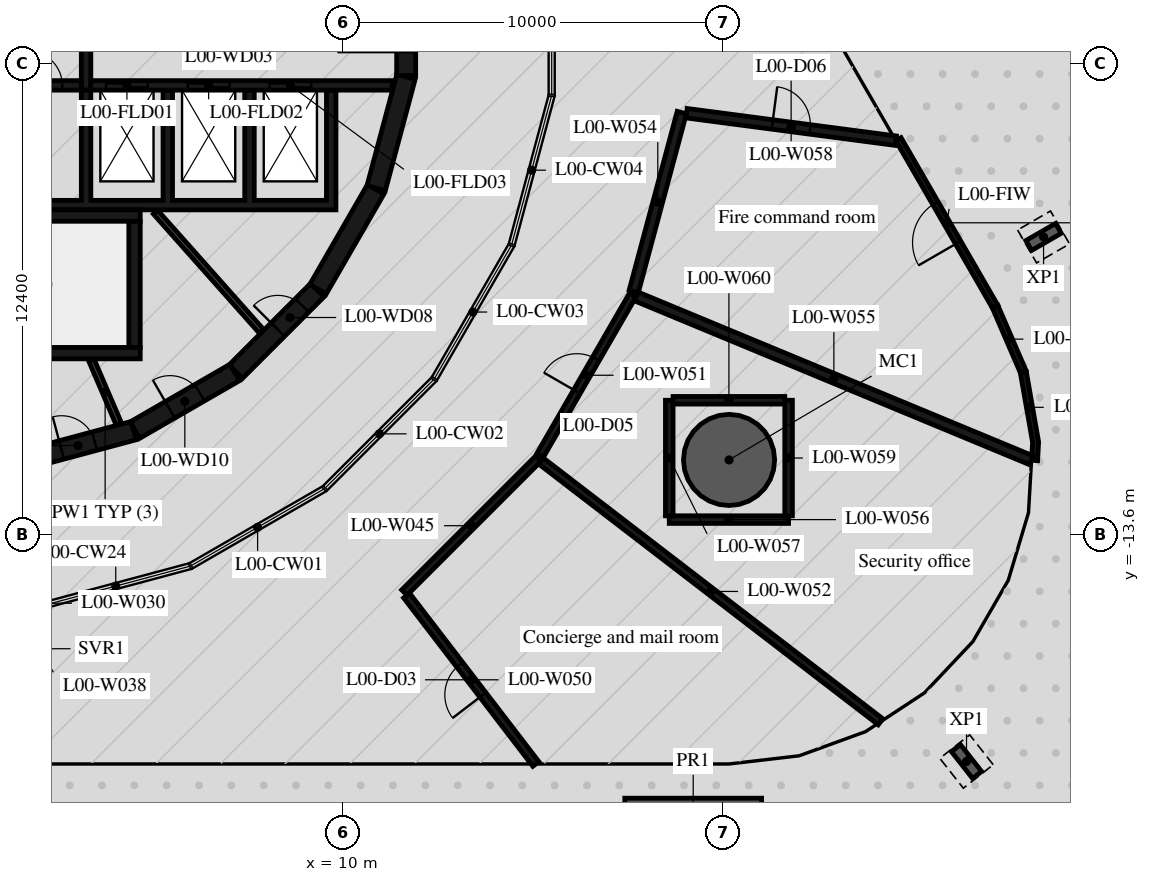
"""IFC4 building model, lengths in metres.
Left out: names, types, materials, properties, quantities, classifications, styles, units other than length and angle.
Written with IfcOpenShell. Run it as: python <this file> out.ifc"""

import sys

from ifc_helpers import new_model, si_unit, direction, frame, frame_2d, origin, origin_2d, place, context, subcontext, project, spatial, polyline, rectangle, hollow_circle, i_section, outline, extrude, element, fill, save


model = new_model("IFC4")
c1 = context("Model", 3, precision=1e-05, world=origin(), true_north=direction((0.0, 1.0)))
c2 = subcontext(c1, "Body", "Model", "MODEL_VIEW")
j1 = project(units=[si_unit("LENGTHUNIT", "METRE"), si_unit("PLANEANGLEUNIT", "RADIAN")], contexts=[c1])
p1 = place(None, origin())
s1 = spatial("IfcSite", under=j1, at=p1, CompositionType="ELEMENT")
p2 = place(p1, origin())
s2 = spatial("IfcBuilding", under=s1, at=p2, CompositionType="ELEMENT")
p3 = place(p2, origin())
s3 = spatial("IfcBuildingStorey", under=s2, at=p3, CompositionType="ELEMENT", Elevation=0.0)
p4 = place(p3, frame((20.144, -11.63, -0.42), z_axis=(0.0, 0.0, 1.0), x_axis=(1.0, 0.0, 0.0)))
e1 = element("IfcColumn", 1, at=p4, inside=s3, PredefinedType="COLUMN", context=c2, shape_type="SweptSolid", body=[
    extrude(hollow_circle(Radius=1.2, WallThickness=0.06, at=origin_2d()), origin(), (0.0, 0.0, 1.0), 9.04),
])
for number, where, z_axis, x_axis in (
    (2, (26.392, -19.565, -0.42), (0.0, 0.0, 1.0), (-0.786, -0.619, 0.0)),
    (3, (28.419, -5.763, -0.42), (0.0, 0.0, 1.0), (0.5, -0.866, 0.0)),
):
    element("IfcColumn", number, at=place(p3, frame(where, z_axis=z_axis, x_axis=x_axis)), inside=s3, PredefinedType="COLUMN", context=c2, shape_type="SweptSolid", body=[
        extrude(i_section(OverallWidth=0.3, OverallDepth=0.9, WebThickness=0.019, FlangeThickness=0.035, FilletRadius=0.03, at=origin_2d()), origin(), (0.0, 0.0, 1.0), 9.04),
    ])
p5 = place(p3, frame((19.2, -21.73, -0.42), z_axis=(0.0, 0.0, 1.0), x_axis=(1.0, 0.0, 0.0)))
e4 = element("IfcColumn", 4, at=p5, inside=s3, PredefinedType="COLUMN", context=c2, shape_type="SweptSolid", body=[
    extrude(rectangle(XDim=3.6, YDim=2.4, at=origin_2d()), origin(), (0.0, 0.0, 1.0), 9.04),
])
p6 = place(p3, frame((27.141, -7.59, 0.0), z_axis=(0.0, 0.0, 1.0), x_axis=(-0.500014995272, 0.866016746087, 0.0)))
e5 = element("IfcWall", 5, at=p6, inside=s3, PredefinedType="STANDARD", context=c2, shape_type="SweptSolid", body=[
    extrude(rectangle(XDim=5.081, YDim=0.16, at=frame_2d((2.541, 0.0))), origin(), (0.0, 0.0, 1.0), 8.62),
])
p7 = place(p6, frame((1.94, 0.0, 0.0)))
e6 = element("IfcOpeningElement", 6, at=p7, cuts=e5, PredefinedType="OPENING", context=c2, shape_type="SweptSolid", body=[
    extrude(rectangle(XDim=1.2, YDim=2.1, at=frame_2d((0.6, 1.05))), frame((0.0, 0.09, 0.0), z_axis=(0.0, -1.0, 0.0), x_axis=(1.0, 0.0, 0.0)), (0.0, 0.0, 1.0), 0.18),
])
p8 = place(p3, origin())
e7 = element("IfcWall", 7, at=p8, inside=s3, PredefinedType="STANDARD", context=c2, shape_type="SweptSolid", body=[
    extrude(outline(polyline([(27.808, -9.335), (28.13, -11.165), (28.102, -11.64), (28.262, -11.65), (28.289, -11.156), (27.965, -9.308), (27.808, -9.335)])), origin(), (0.0, 0.0, 1.0), 8.62),
])
p9 = place(p3, origin())
e8 = element("IfcWall", 8, at=p9, inside=s3, PredefinedType="STANDARD", context=c2, shape_type="SweptSolid", body=[
    extrude(outline(polyline([(27.072, -7.63), (27.808, -9.335), (27.954, -9.272), (27.219, -7.567), (27.072, -7.63)])), origin(), (0.0, 0.0, 1.0), 8.62),
])
p10 = place(p3, frame((1.55, -11.643, 0.0), z_axis=(0.0, 0.0, 1.0), x_axis=(0.965948410781, 0.258734743916, 0.0)))
e9 = element("IfcWall", 9, at=p10, inside=s3, PredefinedType="SHEAR", context=c2, shape_type="SweptSolid", body=[
    extrude(rectangle(XDim=3.033, YDim=0.5, at=frame_2d((1.516, 0.0))), origin(), (0.0, 0.0, 1.0), 8.62),
])
p11 = place(p10, frame((1.066, 0.0, 0.0)))
e10 = element("IfcOpeningElement", 10, at=p11, cuts=e9, PredefinedType="OPENING", context=c2, shape_type="SweptSolid", body=[
    extrude(rectangle(XDim=0.9, YDim=2.1, at=frame_2d((0.45, 1.05))), frame((0.0, 0.26, 0.0), z_axis=(0.0, -1.0, 0.0), x_axis=(1.0, 0.0, 0.0)), (0.0, 0.0, 1.0), 0.52),
])
p12 = place(p3, frame((4.51, -10.845, 0.0), z_axis=(0.0, 0.0, 1.0), x_axis=(0.865975092491, 0.500087131594, 0.0)))
e11 = element("IfcWall", 11, at=p12, inside=s3, PredefinedType="SHEAR", context=c2, shape_type="SweptSolid", body=[
    extrude(rectangle(XDim=3.033, YDim=0.5, at=frame_2d((1.516, 0.0))), origin(), (0.0, 0.0, 1.0), 8.62),
])
p13 = place(p12, frame((1.066, 0.0, 0.0)))
e12 = element("IfcOpeningElement", 12, at=p13, cuts=e11, PredefinedType="OPENING", context=c2, shape_type="SweptSolid", body=[
    extrude(rectangle(XDim=0.9, YDim=2.1, at=frame_2d((0.45, 1.05))), frame((0.0, 0.26, 0.0), z_axis=(0.0, -1.0, 0.0), x_axis=(1.0, 0.0, 0.0)), (0.0, 0.0, 1.0), 0.52),
])
p14 = place(p3, frame((7.164, -9.308, 0.0), z_axis=(0.0, 0.0, 1.0), x_axis=(0.707106781187, 0.707106781187, 0.0)))
e13 = element("IfcWall", 13, at=p14, inside=s3, PredefinedType="SHEAR", context=c2, shape_type="SweptSolid", body=[
    extrude(rectangle(XDim=3.032, YDim=0.5, at=frame_2d((1.516, 0.0))), origin(), (0.0, 0.0, 1.0), 8.62),
])
p15 = place(p14, frame((1.566, 0.0, 0.0)))
e14 = element("IfcOpeningElement", 14, at=p15, cuts=e13, PredefinedType="OPENING", context=c2, shape_type="SweptSolid", body=[
    extrude(rectangle(XDim=0.9, YDim=2.1, at=frame_2d((0.45, 1.05))), frame((0.0, 0.26, 0.0), z_axis=(0.0, -1.0, 0.0), x_axis=(1.0, 0.0, 0.0)), (0.0, 0.0, 1.0), 0.52),
])
for number, where, z_axis, x_axis in (
    (15, (9.329, -7.137, 0.0), (0.0, 0.0, 1.0), (0.5, 0.866, 0.0)),
    (16, (10.858, -4.479, 0.0), (0.0, 0.0, 1.0), (0.259, 0.966, 0.0)),
):
    element("IfcWall", number, at=place(p3, frame(where, z_axis=z_axis, x_axis=x_axis)), inside=s3, PredefinedType="SHEAR", context=c2, shape_type="SweptSolid", body=[
        extrude(rectangle(XDim=3.033, YDim=0.5, at=frame_2d((1.516, 0.0))), origin(), (0.0, 0.0, 1.0), 8.62),
    ])
p16 = place(p3, frame((11.647, -1.516, 0.0), z_axis=(0.0, 0.0, 1.0), x_axis=(0.0, 1.0, 0.0)))
e17 = element("IfcWall", 17, at=p16, inside=s3, PredefinedType="SHEAR", context=c2, shape_type="SweptSolid", body=[
    extrude(rectangle(XDim=3.033, YDim=0.5, at=frame_2d((1.516, 0.0))), origin(), (0.0, 0.0, 1.0), 8.62),
])
p17 = place(p16, frame((0.616, 0.0, 0.0)))
e18 = element("IfcOpeningElement", 18, at=p17, cuts=e17, PredefinedType="OPENING", context=c2, shape_type="SweptSolid", body=[
    extrude(rectangle(XDim=1.8, YDim=2.1, at=frame_2d((0.9, 1.05))), frame((0.0, 0.26, 0.0), z_axis=(0.0, -1.0, 0.0), x_axis=(1.0, 0.0, 0.0)), (0.0, 0.0, 1.0), 0.52),
])
p18 = place(p3, frame((-2.4, -5.2, 0.0), z_axis=(0.0, 0.0, 1.0), x_axis=(1.0, 0.0, 0.0)))
e19 = element("IfcWall", 19, at=p18, inside=s3, PredefinedType="SHEAR", context=c2, shape_type="SweptSolid", body=[
    extrude(rectangle(XDim=7.05, YDim=0.3, at=frame_2d((3.525, 0.0))), origin(), (0.0, 0.0, 1.0), 8.62),
])
p19 = place(p3, frame((4.5, -8.67, 0.0), z_axis=(0.0, 0.0, 1.0), x_axis=(0.0, 1.0, 0.0)))
e20 = element("IfcWall", 20, at=p19, inside=s3, PredefinedType="SHEAR", context=c2, shape_type="SweptSolid", body=[
    extrude(rectangle(XDim=3.32, YDim=0.3, at=frame_2d((1.66, 0.0))), origin(), (0.0, 0.0, 1.0), 8.62),
])
p20 = place(p3, frame((0.1, -8.82, 0.0), z_axis=(0.0, 0.0, 1.0), x_axis=(1.0, 0.0, 0.0)))
e21 = element("IfcWall", 21, at=p20, inside=s3, PredefinedType="SHEAR", context=c2, shape_type="SweptSolid", body=[
    extrude(rectangle(XDim=4.55, YDim=0.3, at=frame_2d((2.275, 0.0))), origin(), (0.0, 0.0, 1.0), 8.62),
])
p21 = place(p3, origin())
e22 = element("IfcWall", 22, at=p21, inside=s3, PredefinedType="SHEAR", context=c2, shape_type="SweptSolid", body=[
    extrude(outline(polyline([(9.8, -5.05), (9.8, -4.8), (9.8, -1.9), (9.55, -1.9), (9.55, -4.8), (7.65, -4.8), (7.65, -1.9), (7.4, -1.9), (7.4, -4.8), (5.5, -4.8), (5.5, -1.9), (5.25, -1.9), (5.25, -4.8), (3.35, -4.8), (3.35, -1.9), (3.1, -1.9), (3.1, -4.8), (1.2, -4.8), (1.2, -1.9), (0.95, -1.9), (0.95, -4.8), (-0.95, -4.8), (-0.95, -1.9), (-1.2, -1.9), (-1.2, -4.8), (-5.25, -4.8), (-5.25, -1.9), (-5.5, -1.9), (-5.5, -4.8), (-7.4, -4.8), (-7.4, -1.9), (-7.65, -1.9), (-7.65, -4.8), (-9.55, -4.8), (-9.55, -1.9), (-9.8, -1.9), (-9.8, -4.8), (-9.8, -5.05), (9.8, -5.05)])), origin(), (0.0, 0.0, 1.0), 8.62),
])
p22 = place(p3, frame((-11.28, -1.775, 0.0), z_axis=(0.0, 0.0, 1.0), x_axis=(1.0, 0.0, 0.0)))
e23 = element("IfcWall", 23, at=p22, inside=s3, PredefinedType="SHEAR", context=c2, shape_type="SweptSolid", body=[
    extrude(rectangle(XDim=14.38, YDim=0.25, at=frame_2d((7.19, 0.0))), origin(), (0.0, 0.0, 1.0), 8.62),
])
p23 = place(p22, frame((2.03, 0.0, 0.0)))
e24 = element("IfcOpeningElement", 24, at=p23, cuts=e23, PredefinedType="OPENING", context=c2, shape_type="SweptSolid", body=[
    extrude(rectangle(XDim=1.3, YDim=2.1, at=frame_2d((0.65, 1.05))), frame((0.0, 0.135, 0.0), z_axis=(0.0, -1.0, 0.0), x_axis=(1.0, 0.0, 0.0)), (0.0, 0.0, 1.0), 0.27),
])
p24 = place(p22, frame((4.18, 0.0, 0.0)))
e25 = element("IfcOpeningElement", 25, at=p24, cuts=e23, PredefinedType="OPENING", context=c2, shape_type="SweptSolid", body=[
    extrude(rectangle(XDim=1.3, YDim=2.1, at=frame_2d((0.65, 1.05))), frame((0.0, 0.135, 0.0), z_axis=(0.0, -1.0, 0.0), x_axis=(1.0, 0.0, 0.0)), (0.0, 0.0, 1.0), 0.27),
])
p25 = place(p22, frame((7.605, 0.0, 0.0)))
e26 = element("IfcOpeningElement", 26, at=p25, cuts=e23, PredefinedType="OPENING", context=c2, shape_type="SweptSolid", body=[
    extrude(rectangle(XDim=0.9, YDim=2.1, at=frame_2d((0.45, 1.05))), frame((0.0, 0.135, 0.0), z_axis=(0.0, -1.0, 0.0), x_axis=(1.0, 0.0, 0.0)), (0.0, 0.0, 1.0), 0.27),
])
p26 = place(p22, frame((10.83, 0.0, 0.0)))
e27 = element("IfcOpeningElement", 27, at=p26, cuts=e23, PredefinedType="OPENING", context=c2, shape_type="SweptSolid", body=[
    extrude(rectangle(XDim=0.9, YDim=2.1, at=frame_2d((0.45, 1.05))), frame((0.0, 0.135, 0.0), z_axis=(0.0, -1.0, 0.0), x_axis=(1.0, 0.0, 0.0)), (0.0, 0.0, 1.0), 0.27),
])
p27 = place(p22, frame((12.98, 0.0, 0.0)))
e28 = element("IfcOpeningElement", 28, at=p27, cuts=e23, PredefinedType="OPENING", context=c2, shape_type="SweptSolid", body=[
    extrude(rectangle(XDim=0.9, YDim=2.1, at=frame_2d((0.45, 1.05))), frame((0.0, 0.135, 0.0), z_axis=(0.0, -1.0, 0.0), x_axis=(1.0, 0.0, 0.0)), (0.0, 0.0, 1.0), 0.27),
])
p28 = place(p3, frame((3.35, -1.775, 0.0), z_axis=(0.0, 0.0, 1.0), x_axis=(1.0, 0.0, 0.0)))
e29 = element("IfcWall", 29, at=p28, inside=s3, PredefinedType="SHEAR", context=c2, shape_type="SweptSolid", body=[
    extrude(rectangle(XDim=7.93, YDim=0.25, at=frame_2d((3.965, 0.0))), origin(), (0.0, 0.0, 1.0), 8.62),
])
p29 = place(p28, frame((0.4, 0.0, 0.0)))
e30 = element("IfcOpeningElement", 30, at=p29, cuts=e29, PredefinedType="OPENING", context=c2, shape_type="SweptSolid", body=[
    extrude(rectangle(XDim=1.1, YDim=2.4, at=frame_2d((0.55, 1.2))), frame((0.0, 0.135, 0.0), z_axis=(0.0, -1.0, 0.0), x_axis=(1.0, 0.0, 0.0)), (0.0, 0.0, 1.0), 0.27),
])
p30 = place(p28, frame((2.55, 0.0, 0.0)))
e31 = element("IfcOpeningElement", 31, at=p30, cuts=e29, PredefinedType="OPENING", context=c2, shape_type="SweptSolid", body=[
    extrude(rectangle(XDim=1.1, YDim=2.4, at=frame_2d((0.55, 1.2))), frame((0.0, 0.135, 0.0), z_axis=(0.0, -1.0, 0.0), x_axis=(1.0, 0.0, 0.0)), (0.0, 0.0, 1.0), 0.27),
])
p31 = place(p28, frame((4.7, 0.0, 0.0)))
e32 = element("IfcOpeningElement", 32, at=p31, cuts=e29, PredefinedType="OPENING", context=c2, shape_type="SweptSolid", body=[
    extrude(rectangle(XDim=1.1, YDim=2.4, at=frame_2d((0.55, 1.2))), frame((0.0, 0.135, 0.0), z_axis=(0.0, -1.0, 0.0), x_axis=(1.0, 0.0, 0.0)), (0.0, 0.0, 1.0), 0.27),
])
p32 = place(p3, frame((3.225, -1.9, 0.0), z_axis=(0.0, 0.0, 1.0), x_axis=(0.0, 1.0, 0.0)))
e33 = element("IfcWall", 33, at=p32, inside=s3, PredefinedType="SHEAR", context=c2, shape_type="SweptSolid", body=[
    extrude(rectangle(XDim=3.8, YDim=0.25, at=frame_2d((1.9, 0.0))), origin(), (0.0, 0.0, 1.0), 8.62),
])
p33 = place(p3, frame((7.842, -8.248, 0.0), z_axis=(0.0, 0.0, 1.0), x_axis=(-0.66446128181, 0.747322691329, 0.0)))
e34 = element("IfcWall", 34, at=p33, inside=s3, PredefinedType="PARTITIONING", context=c2, shape_type="SweptSolid", body=[
    extrude(rectangle(XDim=4.198, YDim=0.15, at=frame_2d((2.099, 0.0))), origin(), (0.0, 0.0, 1.0), 8.62),
])
p34 = place(p3, frame((3.367, -9.007, 0.0), z_axis=(0.0, 0.0, 1.0), x_axis=(0.394387482265, -0.918944238696, 0.0)))
e35 = element("IfcWall", 35, at=p34, inside=s3, PredefinedType="PARTITIONING", context=c2, shape_type="SweptSolid", body=[
    extrude(rectangle(XDim=1.825, YDim=0.15, at=frame_2d((0.913, 0.0))), origin(), (0.0, 0.0, 1.0), 8.62),
])
p35 = place(p3, frame((11.6, -15.12, 0.0), z_axis=(0.0, 0.0, 1.0), x_axis=(0.707106781187, 0.707106781187, 0.0)))
e36 = element("IfcWall", 36, at=p35, inside=s3, PredefinedType="PARTITIONING", context=c2, shape_type="SweptSolid", body=[
    extrude(rectangle(XDim=4.978, YDim=0.2, at=frame_2d((2.489, 0.0))), origin(), (0.0, 0.0, 1.0), 8.62),
])
p36 = place(p3, frame((15.06, -19.63, 0.0), z_axis=(0.0, 0.0, 1.0), x_axis=(-0.608694005511, 0.793405071609, 0.0)))
e37 = element("IfcWall", 37, at=p36, inside=s3, PredefinedType="PARTITIONING", context=c2, shape_type="SweptSolid", body=[
    extrude(rectangle(XDim=5.584, YDim=0.2, at=frame_2d((2.792, 0.0))), origin(), (0.0, 0.0, 1.0), 8.62),
])
p37 = place(p36, frame((2.292, 0.0, 0.0)))
e38 = element("IfcOpeningElement", 38, at=p37, cuts=e37, PredefinedType="OPENING", context=c2, shape_type="SweptSolid", body=[
    extrude(rectangle(XDim=1.0, YDim=2.1, at=frame_2d((0.5, 1.05))), frame((0.0, 0.11, 0.0), z_axis=(0.0, -1.0, 0.0), x_axis=(1.0, 0.0, 0.0)), (0.0, 0.0, 1.0), 0.22),
])
p38 = place(p3, frame((15.17, -11.513, 0.0), z_axis=(0.0, 0.0, 1.0), x_axis=(0.50027843178, 0.865864591432, 0.0)))
e39 = element("IfcWall", 39, at=p38, inside=s3, PredefinedType="PARTITIONING", context=c2, shape_type="SweptSolid", body=[
    extrude(rectangle(XDim=4.878, YDim=0.2, at=frame_2d((2.439, 0.0))), origin(), (0.0, 0.0, 1.0), 8.62),
])
p39 = place(p38, frame((1.939, 0.0, 0.0)))
e40 = element("IfcOpeningElement", 40, at=p39, cuts=e39, PredefinedType="OPENING", context=c2, shape_type="SweptSolid", body=[
    extrude(rectangle(XDim=1.0, YDim=2.1, at=frame_2d((0.5, 1.05))), frame((0.0, 0.11, 0.0), z_axis=(0.0, -1.0, 0.0), x_axis=(1.0, 0.0, 0.0)), (0.0, 0.0, 1.0), 0.22),
])
p40 = place(p3, frame((15.199, -11.661, 0.0), z_axis=(0.0, 0.0, 1.0), x_axis=(0.793079142838, -0.609118603554, 0.0)))
e41 = element("IfcWall", 41, at=p40, inside=s3, PredefinedType="PARTITIONING", context=c2, shape_type="SweptSolid", body=[
    extrude(rectangle(XDim=11.261, YDim=0.2, at=frame_2d((5.63, 0.0))), origin(), (0.0, 0.0, 1.0), 8.62),
])
p41 = place(p3, frame((17.636, -7.193, 0.0), z_axis=(0.0, 0.0, 1.0), x_axis=(0.259518617631, 0.965738104821, 0.0)))
e42 = element("IfcWall", 42, at=p41, inside=s3, PredefinedType="PARTITIONING", context=c2, shape_type="SweptSolid", body=[
    extrude(rectangle(XDim=4.87, YDim=0.25, at=frame_2d((2.435, 0.0))), origin(), (0.0, 0.0, 1.0), 8.62),
])
p42 = place(p3, frame((17.702, -7.328, 0.0), z_axis=(0.0, 0.0, 1.0), x_axis=(0.923733316427, -0.383036238655, 0.0)))
e43 = element("IfcWall", 43, at=p42, inside=s3, PredefinedType="PARTITIONING", context=c2, shape_type="SweptSolid", body=[
    extrude(rectangle(XDim=11.256, YDim=0.25, at=frame_2d((5.628, 0.0))), origin(), (0.0, 0.0, 1.0), 8.62),
])
p43 = place(p3, frame((18.57, -13.2, 0.0), z_axis=(0.0, 0.0, 1.0), x_axis=(1.0, 0.0, 0.0)))
e44 = element("IfcWall", 44, at=p43, inside=s3, PredefinedType="PARTITIONING", context=c2, shape_type="SweptSolid", body=[
    extrude(rectangle(XDim=3.14, YDim=0.2, at=frame_2d((1.57, 0.0))), origin(), (0.0, 0.0, 1.0), 8.62),
])
p44 = place(p3, frame((18.57, -10.06, 0.0), z_axis=(0.0, 0.0, 1.0), x_axis=(0.0, -1.0, 0.0)))
e45 = element("IfcWall", 45, at=p44, inside=s3, PredefinedType="PARTITIONING", context=c2, shape_type="SweptSolid", body=[
    extrude(rectangle(XDim=3.04, YDim=0.2, at=frame_2d((1.52, 0.0))), origin(), (0.0, 0.0, 1.0), 8.62),
])
p45 = place(p3, frame((19.024, -2.506, 0.0), z_axis=(0.0, 0.0, 1.0), x_axis=(0.991474185099, -0.130303262743, 0.0)))
e46 = element("IfcWall", 46, at=p45, inside=s3, PredefinedType="PARTITIONING", context=c2, shape_type="SweptSolid", body=[
    extrude(rectangle(XDim=5.553, YDim=0.25, at=frame_2d((2.777, 0.0))), origin(), (0.0, 0.0, 1.0), 8.62),
])
p46 = place(p45, frame((2.277, 0.0, 0.0)))
e47 = element("IfcOpeningElement", 47, at=p46, cuts=e46, PredefinedType="OPENING", context=c2, shape_type="SweptSolid", body=[
    extrude(rectangle(XDim=1.0, YDim=2.1, at=frame_2d((0.5, 1.05))), frame((0.0, 0.135, 0.0), z_axis=(0.0, -1.0, 0.0), x_axis=(1.0, 0.0, 0.0)), (0.0, 0.0, 1.0), 0.27),
])
p47 = place(p3, frame((21.71, -13.1, 0.0), z_axis=(0.0, 0.0, 1.0), x_axis=(0.0, 1.0, 0.0)))
e48 = element("IfcWall", 48, at=p47, inside=s3, PredefinedType="PARTITIONING", context=c2, shape_type="SweptSolid", body=[
    extrude(rectangle(XDim=3.04, YDim=0.2, at=frame_2d((1.52, 0.0))), origin(), (0.0, 0.0, 1.0), 8.62),
])
p48 = place(p3, frame((21.61, -10.06, 0.0), z_axis=(0.0, 0.0, 1.0), x_axis=(-1.0, 0.0, 0.0)))
e49 = element("IfcWall", 49, at=p48, inside=s3, PredefinedType="PARTITIONING", context=c2, shape_type="SweptSolid", body=[
    extrude(rectangle(XDim=2.94, YDim=0.2, at=frame_2d((1.47, 0.0))), origin(), (0.0, 0.0, 1.0), 8.62),
])
p49 = place(p7, origin())
e50 = element("IfcDoor", 50, at=p49, inside=s3, OperationType="SINGLE_SWING_LEFT", PredefinedType="DOOR", context=c2, shape_type="SweptSolid", body=[
    extrude(rectangle(XDim=1.2, YDim=2.1, at=frame_2d((0.6, 1.05))), frame((0.0, 0.025, 0.0), z_axis=(0.0, -1.0, 0.0), x_axis=(1.0, 0.0, 0.0)), (0.0, 0.0, 1.0), 0.05),
])
fill(e6, e50)
p50 = place(p17, origin())
e51 = element("IfcDoor", 51, at=p50, inside=s3, OperationType="DOUBLE_DOOR_SINGLE_SWING", PredefinedType="DOOR", context=c2, shape_type="SweptSolid", body=[
    extrude(rectangle(XDim=1.8, YDim=2.1, at=frame_2d((0.9, 1.05))), frame((0.0, 0.025, 0.0), z_axis=(0.0, -1.0, 0.0), x_axis=(1.0, 0.0, 0.0)), (0.0, 0.0, 1.0), 0.05),
])
fill(e18, e51)
p51 = place(p29, origin())
e52 = element("IfcDoor", 52, at=p51, inside=s3, OperationType="DOUBLE_DOOR_SLIDING", PredefinedType="DOOR", context=c2, shape_type="SweptSolid", body=[
    extrude(rectangle(XDim=1.1, YDim=2.4, at=frame_2d((0.55, 1.2))), frame((0.0, 0.025, 0.0), z_axis=(0.0, -1.0, 0.0), x_axis=(1.0, 0.0, 0.0)), (0.0, 0.0, 1.0), 0.05),
])
fill(e30, e52)
p52 = place(p30, origin())
e53 = element("IfcDoor", 53, at=p52, inside=s3, OperationType="DOUBLE_DOOR_SLIDING", PredefinedType="DOOR", context=c2, shape_type="SweptSolid", body=[
    extrude(rectangle(XDim=1.1, YDim=2.4, at=frame_2d((0.55, 1.2))), frame((0.0, 0.025, 0.0), z_axis=(0.0, -1.0, 0.0), x_axis=(1.0, 0.0, 0.0)), (0.0, 0.0, 1.0), 0.05),
])
fill(e31, e53)
p53 = place(p31, origin())
e54 = element("IfcDoor", 54, at=p53, inside=s3, OperationType="DOUBLE_DOOR_SLIDING", PredefinedType="DOOR", context=c2, shape_type="SweptSolid", body=[
    extrude(rectangle(XDim=1.1, YDim=2.4, at=frame_2d((0.55, 1.2))), frame((0.0, 0.025, 0.0), z_axis=(0.0, -1.0, 0.0), x_axis=(1.0, 0.0, 0.0)), (0.0, 0.0, 1.0), 0.05),
])
fill(e32, e54)
p54 = place(p27, origin())
e55 = element("IfcDoor", 55, at=p54, inside=s3, OperationType="SINGLE_SWING_LEFT", PredefinedType="DOOR", context=c2, shape_type="SweptSolid", body=[
    extrude(rectangle(XDim=0.9, YDim=2.1, at=frame_2d((0.45, 1.05))), frame((0.0, 0.025, 0.0), z_axis=(0.0, -1.0, 0.0), x_axis=(1.0, 0.0, 0.0)), (0.0, 0.0, 1.0), 0.05),
])
fill(e28, e55)
p55 = place(p15, origin())
e56 = element("IfcDoor", 56, at=p55, inside=s3, OperationType="SINGLE_SWING_LEFT", PredefinedType="DOOR", context=c2, shape_type="SweptSolid", body=[
    extrude(rectangle(XDim=0.9, YDim=2.1, at=frame_2d((0.45, 1.05))), frame((0.0, 0.025, 0.0), z_axis=(0.0, -1.0, 0.0), x_axis=(1.0, 0.0, 0.0)), (0.0, 0.0, 1.0), 0.05),
])
fill(e14, e56)
p56 = place(p11, origin())
e57 = element("IfcDoor", 57, at=p56, inside=s3, OperationType="SINGLE_SWING_RIGHT", PredefinedType="DOOR", context=c2, shape_type="SweptSolid", body=[
    extrude(rectangle(XDim=0.9, YDim=2.1, at=frame_2d((0.45, 1.05))), frame((0.0, 0.025, 0.0), z_axis=(0.0, -1.0, 0.0), x_axis=(1.0, 0.0, 0.0)), (0.0, 0.0, 1.0), 0.05),
])
fill(e10, e57)
p57 = place(p13, origin())
e58 = element("IfcDoor", 58, at=p57, inside=s3, OperationType="SINGLE_SWING_LEFT", PredefinedType="DOOR", context=c2, shape_type="SweptSolid", body=[
    extrude(rectangle(XDim=0.9, YDim=2.1, at=frame_2d((0.45, 1.05))), frame((0.0, 0.025, 0.0), z_axis=(0.0, -1.0, 0.0), x_axis=(1.0, 0.0, 0.0)), (0.0, 0.0, 1.0), 0.05),
])
fill(e12, e58)
p58 = place(p37, origin())
e59 = element("IfcDoor", 59, at=p58, inside=s3, OperationType="SINGLE_SWING_LEFT", PredefinedType="DOOR", context=c2, shape_type="SweptSolid", body=[
    extrude(rectangle(XDim=1.0, YDim=2.1, at=frame_2d((0.5, 1.05))), frame((0.0, 0.025, 0.0), z_axis=(0.0, -1.0, 0.0), x_axis=(1.0, 0.0, 0.0)), (0.0, 0.0, 1.0), 0.05),
])
fill(e38, e59)
p59 = place(p39, origin())
e60 = element("IfcDoor", 60, at=p59, inside=s3, OperationType="SINGLE_SWING_LEFT", PredefinedType="DOOR", context=c2, shape_type="SweptSolid", body=[
    extrude(rectangle(XDim=1.0, YDim=2.1, at=frame_2d((0.5, 1.05))), frame((0.0, 0.025, 0.0), z_axis=(0.0, -1.0, 0.0), x_axis=(1.0, 0.0, 0.0)), (0.0, 0.0, 1.0), 0.05),
])
fill(e40, e60)
p60 = place(p46, origin())
e61 = element("IfcDoor", 61, at=p60, inside=s3, OperationType="SINGLE_SWING_LEFT", PredefinedType="DOOR", context=c2, shape_type="SweptSolid", body=[
    extrude(rectangle(XDim=1.0, YDim=2.1, at=frame_2d((0.5, 1.05))), frame((0.0, 0.025, 0.0), z_axis=(0.0, -1.0, 0.0), x_axis=(1.0, 0.0, 0.0)), (0.0, 0.0, 1.0), 0.05),
])
fill(e47, e61)
save(model, sys.argv[1])
